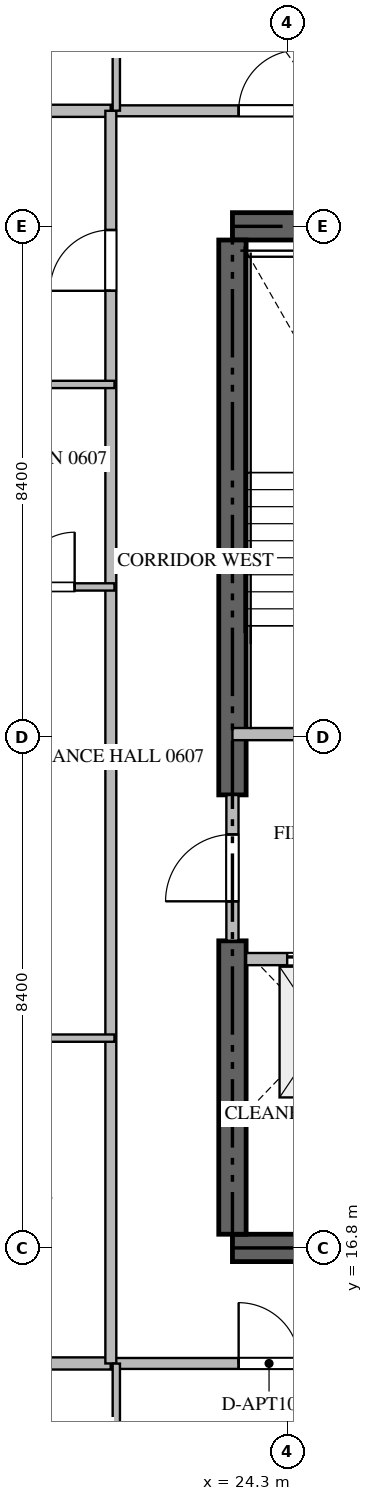
"""IFC4 building model, lengths in metres.
Left out: names, types, materials, properties, quantities, classifications, styles, units other than length and angle.
Written with IfcOpenShell. Run it as: python <this file> out.ifc"""

import sys

from ifc_helpers import new_model, si_unit, direction, frame, frame_2d, origin, place, context, subcontext, project, spatial, rectangle, extrude, source, transform, mapped, element, fill, save


model = new_model("IFC4")
c1 = context("Model", 3, precision=1e-05, world=origin(), true_north=direction((0.0, 1.0)))
c2 = subcontext(c1, "Body", "Model", "MODEL_VIEW")
j1 = project(units=[si_unit("LENGTHUNIT", "METRE"), si_unit("PLANEANGLEUNIT", "RADIAN")], contexts=[c1])
p1 = place(None, origin())
s1 = spatial("IfcSite", under=j1, at=p1, CompositionType="ELEMENT")
p2 = place(p1, origin())
s2 = spatial("IfcBuilding", under=s1, at=p2, CompositionType="ELEMENT")
p3 = place(p2, frame((0.0, 0.0, 30.45)))
s3 = spatial("IfcBuildingStorey", under=s2, at=p3, CompositionType="ELEMENT", Elevation=30.45)
for number, where, z_axis, x_axis in (
    (1, (23.4, 16.8, -0.26), (0.0, 0.0, 1.0), (1.0, 0.0, 0.0)),
    (2, (41.4, 33.6, -0.26), (0.0, 0.0, 1.0), (-1.0, 0.0, 0.0)),
):
    element("IfcWall", number, at=place(p3, frame(where, z_axis=z_axis, x_axis=x_axis)), inside=s3, PredefinedType="SHEAR", context=c2, shape_type="SweptSolid", body=[
        extrude(rectangle(XDim=18.0, YDim=0.45, at=frame_2d((9.0, 0.0))), origin(), (0.0, 0.0, 1.0), 3.748),
    ])
p4 = place(p3, frame((23.4, 17.025, -0.26), z_axis=(0.0, 0.0, 1.0), x_axis=(0.0, 1.0, 0.0)))
e3 = element("IfcWall", 3, at=p4, inside=s3, PredefinedType="SHEAR", context=c2, shape_type="SweptSolid", body=[
    extrude(rectangle(XDim=4.825, YDim=0.45, at=frame_2d((2.413, 0.0))), origin(), (0.0, 0.0, 1.0), 3.748),
])
p5 = place(p3, frame((23.4, 24.25, -0.26), z_axis=(0.0, 0.0, 1.0), x_axis=(0.0, 1.0, 0.0)))
e4 = element("IfcWall", 4, at=p5, inside=s3, PredefinedType="SHEAR", context=c2, shape_type="SweptSolid", body=[
    extrude(rectangle(XDim=9.125, YDim=0.45, at=frame_2d((4.562, 0.0))), origin(), (0.0, 0.0, 1.0), 3.748),
])
p6 = place(p3, frame((23.4, 25.25, 0.0), z_axis=(0.0, 0.0, 1.0), x_axis=(1.0, 0.0, 0.0)))
e5 = element("IfcWall", 5, at=p6, inside=s3, PredefinedType="STANDARD", context=c2, shape_type="SweptSolid", body=[
    extrude(rectangle(XDim=4.45, YDim=0.2, at=frame_2d((2.225, 0.0))), origin(), (0.0, 0.0, 1.0), 3.49),
])
p7 = place(p6, frame((1.65, 0.0, 0.0)))
e6 = element("IfcOpeningElement", 6, at=p7, cuts=e5, PredefinedType="OPENING", context=c2, shape_type="SweptSolid", body=[
    extrude(rectangle(XDim=1.1, YDim=2.15, at=frame_2d((0.55, 1.075))), frame((0.0, 0.11, 0.0), z_axis=(0.0, -1.0, 0.0), x_axis=(1.0, 0.0, 0.0)), (0.0, 0.0, 1.0), 0.22),
])
p8 = place(p3, frame((23.625, 21.55, 0.0), z_axis=(0.0, 0.0, 1.0), x_axis=(1.0, 0.0, 0.0)))
e7 = element("IfcWall", 7, at=p8, inside=s3, PredefinedType="STANDARD", context=c2, shape_type="SweptSolid", body=[
    extrude(rectangle(XDim=2.425, YDim=0.2, at=frame_2d((1.212, 0.0))), origin(), (0.0, 0.0, 1.0), 3.49),
])
p9 = place(p8, frame((0.675, 0.0, 0.0)))
e8 = element("IfcOpeningElement", 8, at=p9, cuts=e7, PredefinedType="OPENING", context=c2, shape_type="SweptSolid", body=[
    extrude(rectangle(XDim=1.2, YDim=2.2, at=frame_2d((0.6, 1.1))), frame((0.0, 0.11, 0.0), z_axis=(0.0, -1.0, 0.0), x_axis=(1.0, 0.0, 0.0)), (0.0, 0.0, 1.0), 0.22),
])
p10 = place(p3, frame((23.625, 19.05, 0.0), z_axis=(0.0, 0.0, 1.0), x_axis=(1.0, 0.0, 0.0)))
e9 = element("IfcWall", 9, at=p10, inside=s3, PredefinedType="STANDARD", context=c2, shape_type="SweptSolid", body=[
    extrude(rectangle(XDim=2.425, YDim=0.2, at=frame_2d((1.212, 0.0))), origin(), (0.0, 0.0, 1.0), 3.49),
])
p11 = place(p3, frame((23.4, 21.852, 0.0), z_axis=(0.0, 0.0, 1.0), x_axis=(0.0, 1.0, 0.0)))
e10 = element("IfcWall", 10, at=p11, inside=s3, PredefinedType="STANDARD", context=c2, shape_type="SweptSolid", body=[
    extrude(rectangle(XDim=2.396, YDim=0.2, at=frame_2d((1.198, 0.0))), origin(), (0.0, 0.0, 1.0), 3.49),
])
p12 = place(p11, frame((0.648, 0.0, 0.0)))
e11 = element("IfcOpeningElement", 11, at=p12, cuts=e10, PredefinedType="OPENING", context=c2, shape_type="SweptSolid", body=[
    extrude(rectangle(XDim=1.1, YDim=2.15, at=frame_2d((0.55, 1.075))), frame((0.0, 0.11, 0.0), z_axis=(0.0, -1.0, 0.0), x_axis=(1.0, 0.0, 0.0)), (0.0, 0.0, 1.0), 0.22),
])
for number, where, z_axis, x_axis in (
    (12, (6.082, 14.9, 0.0), (0.0, 0.0, 1.0), (1.0, 0.0, 0.0)),
    (13, (6.082, 35.5, 0.0), (0.0, 0.0, 1.0), (1.0, 0.0, 0.0)),
):
    element("IfcWall", number, at=place(p3, frame(where, z_axis=z_axis, x_axis=x_axis)), inside=s3, PredefinedType="PARTITIONING", context=c2, shape_type="SweptSolid", body=[
        extrude(rectangle(XDim=15.318, YDim=0.2, at=frame_2d((7.659, 0.0))), origin(), (0.0, 0.0, 1.0), 3.49),
    ])
p13 = place(p3, frame((21.402, 14.9, 0.0), z_axis=(0.0, 0.0, 1.0), x_axis=(1.0, 0.0, 0.0)))
e14 = element("IfcWall", 14, at=p13, inside=s3, PredefinedType="PARTITIONING", context=c2, shape_type="SweptSolid", body=[
    extrude(rectangle(XDim=21.996, YDim=0.18, at=frame_2d((10.998, 0.0))), origin(), (0.0, 0.0, 1.0), 3.49),
])
p14 = place(p13, frame((2.1, 0.0, 0.0)))
e15 = element("IfcOpeningElement", 15, at=p14, cuts=e14, PredefinedType="OPENING", context=c2, shape_type="SweptSolid", body=[
    extrude(rectangle(XDim=1.0, YDim=2.15, at=frame_2d((0.5, 1.075))), frame((0.0, 0.1, 0.0), z_axis=(0.0, -1.0, 0.0), x_axis=(1.0, 0.0, 0.0)), (0.0, 0.0, 1.0), 0.2),
])
p15 = place(p13, frame((6.719, 0.0, 0.0)))
e16 = element("IfcOpeningElement", 16, at=p15, cuts=e14, PredefinedType="OPENING", context=c2, shape_type="SweptSolid", body=[
    extrude(rectangle(XDim=1.0, YDim=2.15, at=frame_2d((0.5, 1.075))), frame((0.0, 0.1, 0.0), z_axis=(0.0, -1.0, 0.0), x_axis=(1.0, 0.0, 0.0)), (0.0, 0.0, 1.0), 0.2),
])
p16 = place(p13, frame((18.896, 0.0, 0.0)))
e17 = element("IfcOpeningElement", 17, at=p16, cuts=e14, PredefinedType="OPENING", context=c2, shape_type="SweptSolid", body=[
    extrude(rectangle(XDim=1.0, YDim=2.15, at=frame_2d((0.5, 1.075))), frame((0.0, 0.1, 0.0), z_axis=(0.0, -1.0, 0.0), x_axis=(1.0, 0.0, 0.0)), (0.0, 0.0, 1.0), 0.2),
])
p17 = place(p3, frame((21.402, 35.5, 0.0), z_axis=(0.0, 0.0, 1.0), x_axis=(1.0, 0.0, 0.0)))
e18 = element("IfcWall", 18, at=p17, inside=s3, PredefinedType="PARTITIONING", context=c2, shape_type="SweptSolid", body=[
    extrude(rectangle(XDim=21.996, YDim=0.18, at=frame_2d((10.998, 0.0))), origin(), (0.0, 0.0, 1.0), 3.49),
])
p18 = place(p17, frame((2.1, 0.0, 0.0)))
e19 = element("IfcOpeningElement", 19, at=p18, cuts=e18, PredefinedType="OPENING", context=c2, shape_type="SweptSolid", body=[
    extrude(rectangle(XDim=1.0, YDim=2.15, at=frame_2d((0.5, 1.075))), frame((0.0, 0.1, 0.0), z_axis=(0.0, -1.0, 0.0), x_axis=(1.0, 0.0, 0.0)), (0.0, 0.0, 1.0), 0.2),
])
p19 = place(p17, frame((14.277, 0.0, 0.0)))
e20 = element("IfcOpeningElement", 20, at=p19, cuts=e18, PredefinedType="OPENING", context=c2, shape_type="SweptSolid", body=[
    extrude(rectangle(XDim=1.0, YDim=2.15, at=frame_2d((0.5, 1.075))), frame((0.0, 0.1, 0.0), z_axis=(0.0, -1.0, 0.0), x_axis=(1.0, 0.0, 0.0)), (0.0, 0.0, 1.0), 0.2),
])
p20 = place(p17, frame((18.896, 0.0, 0.0)))
e21 = element("IfcOpeningElement", 21, at=p20, cuts=e18, PredefinedType="OPENING", context=c2, shape_type="SweptSolid", body=[
    extrude(rectangle(XDim=1.0, YDim=2.15, at=frame_2d((0.5, 1.075))), frame((0.0, 0.1, 0.0), z_axis=(0.0, -1.0, 0.0), x_axis=(1.0, 0.0, 0.0)), (0.0, 0.0, 1.0), 0.2),
])
p21 = place(p3, frame((21.4, 14.9, 0.0), z_axis=(0.0, 0.0, 1.0), x_axis=(0.0, 1.0, 0.0)))
e22 = element("IfcWall", 22, at=p21, inside=s3, PredefinedType="PARTITIONING", context=c2, shape_type="SweptSolid", body=[
    extrude(rectangle(XDim=20.6, YDim=0.18, at=frame_2d((10.3, 0.0))), origin(), (0.0, 0.0, 1.0), 3.49),
])
p22 = place(p21, frame((17.64, 0.0, 0.0)))
e23 = element("IfcOpeningElement", 23, at=p22, cuts=e22, PredefinedType="OPENING", context=c2, shape_type="SweptSolid", body=[
    extrude(rectangle(XDim=1.0, YDim=2.15, at=frame_2d((0.5, 1.075))), frame((0.0, 0.1, 0.0), z_axis=(0.0, -1.0, 0.0), x_axis=(1.0, 0.0, 0.0)), (0.0, 0.0, 1.0), 0.2),
])
for number, where, z_axis, x_axis in (
    (24, (21.49, 12.15, 0.0), (0.0, 0.0, 1.0), (0.0, 1.0, 0.0)),
    (25, (21.49, 38.25, 0.0), (0.0, 0.0, 1.0), (0.0, -1.0, 0.0)),
):
    element("IfcWall", number, at=place(p3, frame(where, z_axis=z_axis, x_axis=x_axis)), inside=s3, PredefinedType="PARTITIONING", context=c2, shape_type="SweptSolid", body=[
        extrude(rectangle(XDim=2.748, YDim=0.12, at=frame_2d((1.374, 0.0))), origin(), (0.0, 0.0, 1.0), 3.49),
    ])
p23 = place(p3, frame((18.65, 31.0, 0.0), z_axis=(0.0, 0.0, 1.0), x_axis=(1.0, 0.0, 0.0)))
e26 = element("IfcWall", 26, at=p23, inside=s3, PredefinedType="PARTITIONING", context=c2, shape_type="SweptSolid", body=[
    extrude(rectangle(XDim=2.81, YDim=0.12, at=frame_2d((1.405, 0.0))), origin(), (0.0, 0.0, 1.0), 3.49),
])
p24 = place(p3, frame((19.25, 27.67, 0.0), z_axis=(0.0, 0.0, 1.0), x_axis=(1.0, 0.0, 0.0)))
e27 = element("IfcWall", 27, at=p24, inside=s3, PredefinedType="PARTITIONING", context=c2, shape_type="SweptSolid", body=[
    extrude(rectangle(XDim=2.21, YDim=0.12, at=frame_2d((1.105, 0.0))), origin(), (0.0, 0.0, 1.0), 3.49),
])
p25 = place(p24, frame((0.655, 0.0, 0.0)))
e28 = element("IfcOpeningElement", 28, at=p25, cuts=e27, PredefinedType="OPENING", context=c2, shape_type="SweptSolid", body=[
    extrude(rectangle(XDim=0.9, YDim=2.1, at=frame_2d((0.45, 1.05))), frame((0.0, 0.07, 0.0), z_axis=(0.0, -1.0, 0.0), x_axis=(1.0, 0.0, 0.0)), (0.0, 0.0, 1.0), 0.14),
])
p26 = place(p3, frame((19.252, 20.25, 0.0), z_axis=(0.0, 0.0, 1.0), x_axis=(1.0, 0.0, 0.0)))
e29 = element("IfcWall", 29, at=p26, inside=s3, PredefinedType="PARTITIONING", context=c2, shape_type="SweptSolid", body=[
    extrude(rectangle(XDim=2.208, YDim=0.12, at=frame_2d((1.104, 0.0))), origin(), (0.0, 0.0, 1.0), 3.49),
])
m1 = source(origin(), c2, "Body", "SweptSolid", [
    extrude(rectangle(XDim=1.2, YDim=2.2, at=frame_2d((0.6, 1.1))), frame((0.0, 0.025, 0.0), z_axis=(0.0, -1.0, 0.0), x_axis=(1.0, 0.0, 0.0)), (0.0, 0.0, 1.0), 0.05),
])
p27 = place(p9, origin())
e30 = element("IfcDoor", 30, at=p27, inside=s3, OperationType="DOUBLE_DOOR_SLIDING", PredefinedType="DOOR", context=c2, shape_type="MappedRepresentation", body=[
    mapped(m1, transform((0.0, 0.0, 0.0), scale=1.0)),
])
fill(e8, e30)
m2 = source(origin(), c2, "Body", "SweptSolid", [
    extrude(rectangle(XDim=1.1, YDim=2.15, at=frame_2d((0.55, 1.075))), frame((0.0, 0.025, 0.0), z_axis=(0.0, -1.0, 0.0), x_axis=(1.0, 0.0, 0.0)), (0.0, 0.0, 1.0), 0.05),
])
p28 = place(p12, origin())
e31 = element("IfcDoor", 31, at=p28, inside=s3, OperationType="SINGLE_SWING_LEFT", PredefinedType="DOOR", context=c2, shape_type="MappedRepresentation", body=[
    mapped(m2, transform((0.0, 0.0, 0.0), scale=1.0)),
])
fill(e11, e31)
m3 = source(origin(), c2, "Body", "SweptSolid", [
    extrude(rectangle(XDim=1.0, YDim=2.15, at=frame_2d((0.5, 1.075))), frame((0.0, 0.025, 0.0), z_axis=(0.0, -1.0, 0.0), x_axis=(1.0, 0.0, 0.0)), (0.0, 0.0, 1.0), 0.05),
])
p29 = place(p14, origin())
e32 = element("IfcDoor", 32, at=p29, inside=s3, OperationType="SINGLE_SWING_LEFT", PredefinedType="DOOR", context=c2, shape_type="MappedRepresentation", body=[
    mapped(m3, transform((0.0, 0.0, 0.0), scale=1.0)),
])
fill(e15, e32)
p30 = place(p18, origin())
e33 = element("IfcDoor", 33, at=p30, inside=s3, OperationType="SINGLE_SWING_RIGHT", PredefinedType="DOOR", context=c2, shape_type="MappedRepresentation", body=[
    mapped(m3, transform((0.0, 0.0, 0.0), scale=1.0)),
])
fill(e19, e33)
p31 = place(p22, origin())
e34 = element("IfcDoor", 34, at=p31, inside=s3, OperationType="SINGLE_SWING_LEFT", PredefinedType="DOOR", context=c2, shape_type="MappedRepresentation", body=[
    mapped(m3, transform((0.0, 0.0, 0.0), scale=1.0)),
])
fill(e23, e34)
m4 = source(origin(), c2, "Body", "SweptSolid", [
    extrude(rectangle(XDim=0.9, YDim=2.1, at=frame_2d((0.45, 1.05))), frame((0.0, 0.025, 0.0), z_axis=(0.0, -1.0, 0.0), x_axis=(1.0, 0.0, 0.0)), (0.0, 0.0, 1.0), 0.05),
])
p32 = place(p25, origin())
e35 = element("IfcDoor", 35, at=p32, inside=s3, OperationType="SINGLE_SWING_RIGHT", PredefinedType="DOOR", context=c2, shape_type="MappedRepresentation", body=[
    mapped(m4, transform((0.0, 0.0, 0.0), scale=1.0)),
])
fill(e28, e35)
save(model, sys.argv[1])
